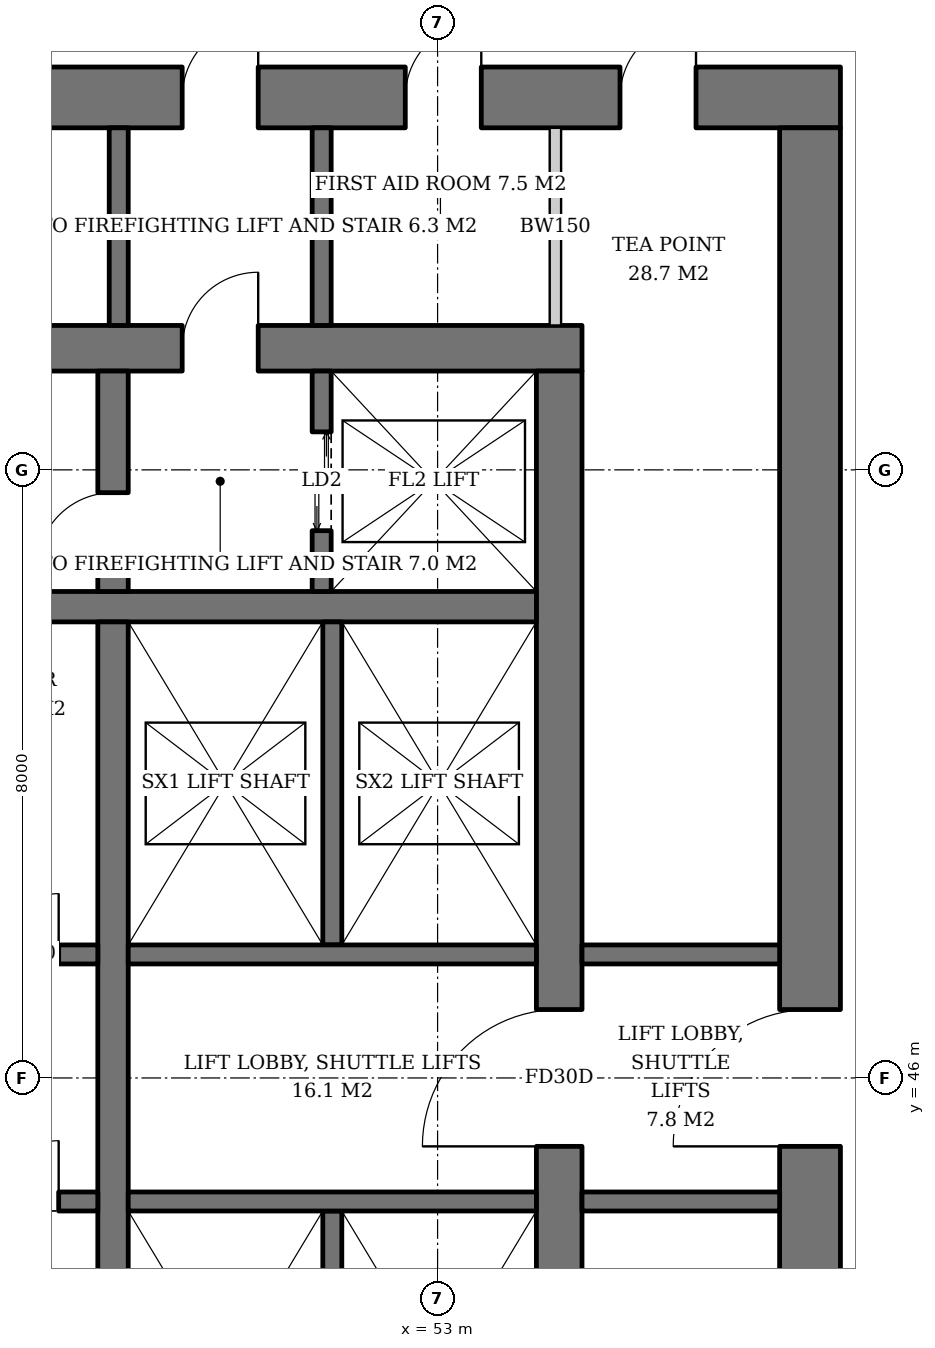
"""IFC4 building model, lengths in metres.
Left out: names, types, materials, properties, quantities, classifications, styles, units other than length and angle.
Written with IfcOpenShell. Run it as: python <this file> out.ifc"""

import sys

from ifc_helpers import new_model, si_unit, direction, frame, frame_2d, origin, place, context, subcontext, project, spatial, rectangle, extrude, element, fill, save


model = new_model("IFC4")
c1 = context("Model", 3, precision=1e-05, world=origin(), true_north=direction((0.0, 1.0)))
c2 = subcontext(c1, "Body", "Model", "MODEL_VIEW")
j1 = project(units=[si_unit("LENGTHUNIT", "METRE"), si_unit("PLANEANGLEUNIT", "RADIAN")], contexts=[c1])
p1 = place(None, origin())
s1 = spatial("IfcSite", under=j1, at=p1, CompositionType="ELEMENT")
p2 = place(p1, origin())
s2 = spatial("IfcBuilding", under=s1, at=p2, CompositionType="ELEMENT")
p3 = place(p2, frame((0.0, 0.0, 36.2)))
s3 = spatial("IfcBuildingStorey", under=s2, at=p3, CompositionType="ELEMENT", Elevation=36.2)
p4 = place(p3, frame((35.1, 55.6, 0.0), z_axis=(0.0, 0.0, 1.0), x_axis=(1.0, 0.0, 0.0)))
e1 = element("IfcWall", 1, at=p4, inside=s3, PredefinedType="SHEAR", context=c2, shape_type="SweptSolid", body=[
    extrude(rectangle(XDim=19.8, YDim=0.6, at=frame_2d((9.9, 0.0))), origin(), (0.0, 0.0, 1.0), 3.8),
])
p5 = place(p4, frame((14.54, 0.0, 0.0)))
e2 = element("IfcOpeningElement", 2, at=p5, cuts=e1, PredefinedType="OPENING", context=c2, shape_type="SweptSolid", body=[
    extrude(rectangle(XDim=1.0, YDim=2.1, at=frame_2d((0.5, 1.05))), frame((0.0, 0.31, 0.0), z_axis=(0.0, -1.0, 0.0), x_axis=(1.0, 0.0, 0.0)), (0.0, 0.0, 1.0), 0.62),
])
p6 = place(p4, frame((2.425, 0.0, 0.0)))
e3 = element("IfcOpeningElement", 3, at=p6, cuts=e1, PredefinedType="OPENING", context=c2, shape_type="SweptSolid", body=[
    extrude(rectangle(XDim=1.0, YDim=2.1, at=frame_2d((0.5, 1.05))), frame((0.0, 0.31, 0.0), z_axis=(0.0, -1.0, 0.0), x_axis=(1.0, 0.0, 0.0)), (0.0, 0.0, 1.0), 0.62),
])
p7 = place(p3, frame((54.6, 36.7, 0.0), z_axis=(0.0, 0.0, 1.0), x_axis=(0.0, 1.0, 0.0)))
e4 = element("IfcWall", 4, at=p7, inside=s3, PredefinedType="SHEAR", context=c2, shape_type="SweptSolid", body=[
    extrude(rectangle(XDim=18.6, YDim=0.6, at=frame_2d((9.3, 0.0))), origin(), (0.0, 0.0, 1.0), 3.8),
])
p8 = place(p7, frame((8.4, 0.0, 0.0)))
e5 = element("IfcOpeningElement", 5, at=p8, cuts=e4, PredefinedType="OPENING", context=c2, shape_type="SweptSolid", body=[
    extrude(rectangle(XDim=1.8, YDim=2.4, at=frame_2d((0.9, 1.2))), frame((0.0, 0.31, 0.0), z_axis=(0.0, -1.0, 0.0), x_axis=(1.0, 0.0, 0.0)), (0.0, 0.0, 1.0), 0.62),
])
p9 = place(p3, frame((31.7, 58.9, 0.0), z_axis=(0.0, 0.0, 1.0), x_axis=(1.0, 0.0, 0.0)))
e6 = element("IfcWall", 6, at=p9, inside=s3, PredefinedType="SHEAR", context=c2, shape_type="SweptSolid", body=[
    extrude(rectangle(XDim=26.6, YDim=0.8, at=frame_2d((13.3, 0.0))), origin(), (0.0, 0.0, 1.0), 3.8),
])
p10 = place(p9, frame((17.94, 0.0, 0.0)))
e7 = element("IfcOpeningElement", 7, at=p10, cuts=e6, PredefinedType="OPENING", context=c2, shape_type="SweptSolid", body=[
    extrude(rectangle(XDim=1.0, YDim=2.1, at=frame_2d((0.5, 1.05))), frame((0.0, 0.41, 0.0), z_axis=(0.0, -1.0, 0.0), x_axis=(1.0, 0.0, 0.0)), (0.0, 0.0, 1.0), 0.82),
])
p11 = place(p9, frame((5.825, 0.0, 0.0)))
e8 = element("IfcOpeningElement", 8, at=p11, cuts=e6, PredefinedType="OPENING", context=c2, shape_type="SweptSolid", body=[
    extrude(rectangle(XDim=1.0, YDim=2.1, at=frame_2d((0.5, 1.05))), frame((0.0, 0.41, 0.0), z_axis=(0.0, -1.0, 0.0), x_axis=(1.0, 0.0, 0.0)), (0.0, 0.0, 1.0), 0.82),
])
p12 = place(p9, frame((1.607, 0.0, 0.0)))
e9 = element("IfcOpeningElement", 9, at=p12, cuts=e6, PredefinedType="OPENING", context=c2, shape_type="SweptSolid", body=[
    extrude(rectangle(XDim=1.0, YDim=2.1, at=frame_2d((0.5, 1.05))), frame((0.0, 0.41, 0.0), z_axis=(0.0, -1.0, 0.0), x_axis=(1.0, 0.0, 0.0)), (0.0, 0.0, 1.0), 0.82),
])
p13 = place(p9, frame((3.666, 0.0, 0.0)))
e10 = element("IfcOpeningElement", 10, at=p13, cuts=e6, PredefinedType="OPENING", context=c2, shape_type="SweptSolid", body=[
    extrude(rectangle(XDim=1.0, YDim=2.1, at=frame_2d((0.5, 1.05))), frame((0.0, 0.41, 0.0), z_axis=(0.0, -1.0, 0.0), x_axis=(1.0, 0.0, 0.0)), (0.0, 0.0, 1.0), 0.82),
])
p14 = place(p9, frame((11.577, 0.0, 0.0)))
e11 = element("IfcOpeningElement", 11, at=p14, cuts=e6, PredefinedType="OPENING", context=c2, shape_type="SweptSolid", body=[
    extrude(rectangle(XDim=1.0, YDim=2.1, at=frame_2d((0.5, 1.05))), frame((0.0, 0.41, 0.0), z_axis=(0.0, -1.0, 0.0), x_axis=(1.0, 0.0, 0.0)), (0.0, 0.0, 1.0), 0.82),
])
p15 = place(p9, frame((20.875, 0.0, 0.0)))
e12 = element("IfcOpeningElement", 12, at=p15, cuts=e6, PredefinedType="OPENING", context=c2, shape_type="SweptSolid", body=[
    extrude(rectangle(XDim=1.0, YDim=2.1, at=frame_2d((0.5, 1.05))), frame((0.0, 0.41, 0.0), z_axis=(0.0, -1.0, 0.0), x_axis=(1.0, 0.0, 0.0)), (0.0, 0.0, 1.0), 0.82),
])
p16 = place(p9, frame((23.7, 0.0, 0.0)))
e13 = element("IfcOpeningElement", 13, at=p16, cuts=e6, PredefinedType="OPENING", context=c2, shape_type="SweptSolid", body=[
    extrude(rectangle(XDim=1.0, YDim=2.1, at=frame_2d((0.5, 1.05))), frame((0.0, 0.41, 0.0), z_axis=(0.0, -1.0, 0.0), x_axis=(1.0, 0.0, 0.0)), (0.0, 0.0, 1.0), 0.82),
])
p17 = place(p3, frame((57.9, 33.5, 0.0), z_axis=(0.0, 0.0, 1.0), x_axis=(0.0, 1.0, 0.0)))
e14 = element("IfcWall", 14, at=p17, inside=s3, PredefinedType="SHEAR", context=c2, shape_type="SweptSolid", body=[
    extrude(rectangle(XDim=25.0, YDim=0.8, at=frame_2d((12.5, 0.0))), origin(), (0.0, 0.0, 1.0), 3.8),
])
p18 = place(p17, frame((11.6, 0.0, 0.0)))
e15 = element("IfcOpeningElement", 15, at=p18, cuts=e14, PredefinedType="OPENING", context=c2, shape_type="SweptSolid", body=[
    extrude(rectangle(XDim=1.8, YDim=2.4, at=frame_2d((0.9, 1.2))), frame((0.0, 0.41, 0.0), z_axis=(0.0, -1.0, 0.0), x_axis=(1.0, 0.0, 0.0)), (0.0, 0.0, 1.0), 0.82),
])
p19 = place(p3, frame((35.7, 52.2, 0.0), z_axis=(0.0, 0.0, 1.0), x_axis=(1.0, 0.0, 0.0)))
e16 = element("IfcWall", 16, at=p19, inside=s3, PredefinedType="SHEAR", context=c2, shape_type="SweptSolid", body=[
    extrude(rectangle(XDim=18.6, YDim=0.4, at=frame_2d((9.3, 0.0))), origin(), (0.0, 0.0, 1.0), 3.8),
])
p20 = place(p3, frame((48.73, 40.0, 0.0), z_axis=(0.0, 0.0, 1.0), x_axis=(0.0, 1.0, 0.0)))
e17 = element("IfcWall", 17, at=p20, inside=s3, PredefinedType="SHEAR", context=c2, shape_type="SweptSolid", body=[
    extrude(rectangle(XDim=12.0, YDim=0.4, at=frame_2d((6.0, 0.0))), origin(), (0.0, 0.0, 1.0), 3.8),
])
p21 = place(p3, frame((48.73, 52.4, 0.0), z_axis=(0.0, 0.0, 1.0), x_axis=(0.0, 1.0, 0.0)))
e18 = element("IfcWall", 18, at=p21, inside=s3, PredefinedType="SHEAR", context=c2, shape_type="SweptSolid", body=[
    extrude(rectangle(XDim=2.9, YDim=0.4, at=frame_2d((1.45, 0.0))), origin(), (0.0, 0.0, 1.0), 3.8),
])
p22 = place(p21, frame((0.3, 0.0, 0.0)))
e19 = element("IfcOpeningElement", 19, at=p22, cuts=e18, PredefinedType="OPENING", context=c2, shape_type="SweptSolid", body=[
    extrude(rectangle(XDim=1.0, YDim=2.1, at=frame_2d((0.5, 1.05))), frame((0.0, 0.21, 0.0), z_axis=(0.0, -1.0, 0.0), x_axis=(1.0, 0.0, 0.0)), (0.0, 0.0, 1.0), 0.42),
])
p23 = place(p3, frame((51.475, 52.4, 0.0), z_axis=(0.0, 0.0, 1.0), x_axis=(0.0, 1.0, 0.0)))
e20 = element("IfcWall", 20, at=p23, inside=s3, PredefinedType="SHEAR", context=c2, shape_type="SweptSolid", body=[
    extrude(rectangle(XDim=2.9, YDim=0.25, at=frame_2d((1.45, 0.0))), origin(), (0.0, 0.0, 1.0), 3.8),
])
p24 = place(p23, frame((0.8, 0.0, 0.0)))
e21 = element("IfcOpeningElement", 21, at=p24, cuts=e20, PredefinedType="OPENING", context=c2, shape_type="SweptSolid", body=[
    extrude(rectangle(XDim=1.3, YDim=2.2, at=frame_2d((0.65, 1.1))), frame((0.0, 0.135, 0.0), z_axis=(0.0, -1.0, 0.0), x_axis=(1.0, 0.0, 0.0)), (0.0, 0.0, 1.0), 0.27),
])
p25 = place(p3, frame((35.7, 47.625, 0.0), z_axis=(0.0, 0.0, 1.0), x_axis=(1.0, 0.0, 0.0)))
e22 = element("IfcWall", 22, at=p25, inside=s3, PredefinedType="SHEAR", context=c2, shape_type="SweptSolid", body=[
    extrude(rectangle(XDim=12.83, YDim=0.25, at=frame_2d((6.415, 0.0))), origin(), (0.0, 0.0, 1.0), 3.8),
])
p26 = place(p25, frame((0.7, 0.0, 0.0)))
e23 = element("IfcOpeningElement", 23, at=p26, cuts=e22, PredefinedType="OPENING", context=c2, shape_type="SweptSolid", body=[
    extrude(rectangle(XDim=1.1, YDim=2.2, at=frame_2d((0.55, 1.1))), frame((0.0, 0.135, 0.0), z_axis=(0.0, -1.0, 0.0), x_axis=(1.0, 0.0, 0.0)), (0.0, 0.0, 1.0), 0.27),
])
p27 = place(p25, frame((3.45, 0.0, 0.0)))
e24 = element("IfcOpeningElement", 24, at=p27, cuts=e22, PredefinedType="OPENING", context=c2, shape_type="SweptSolid", body=[
    extrude(rectangle(XDim=1.1, YDim=2.2, at=frame_2d((0.55, 1.1))), frame((0.0, 0.135, 0.0), z_axis=(0.0, -1.0, 0.0), x_axis=(1.0, 0.0, 0.0)), (0.0, 0.0, 1.0), 0.27),
])
p28 = place(p25, frame((6.2, 0.0, 0.0)))
e25 = element("IfcOpeningElement", 25, at=p28, cuts=e22, PredefinedType="OPENING", context=c2, shape_type="SweptSolid", body=[
    extrude(rectangle(XDim=1.1, YDim=2.2, at=frame_2d((0.55, 1.1))), frame((0.0, 0.135, 0.0), z_axis=(0.0, -1.0, 0.0), x_axis=(1.0, 0.0, 0.0)), (0.0, 0.0, 1.0), 0.27),
])
p29 = place(p25, frame((8.95, 0.0, 0.0)))
e26 = element("IfcOpeningElement", 26, at=p29, cuts=e22, PredefinedType="OPENING", context=c2, shape_type="SweptSolid", body=[
    extrude(rectangle(XDim=1.1, YDim=2.2, at=frame_2d((0.55, 1.1))), frame((0.0, 0.135, 0.0), z_axis=(0.0, -1.0, 0.0), x_axis=(1.0, 0.0, 0.0)), (0.0, 0.0, 1.0), 0.27),
])
p30 = place(p25, frame((11.515, 0.0, 0.0)))
e27 = element("IfcOpeningElement", 27, at=p30, cuts=e22, PredefinedType="OPENING", context=c2, shape_type="SweptSolid", body=[
    extrude(rectangle(XDim=0.8, YDim=2.0, at=frame_2d((0.4, 1.0))), frame((0.0, 0.135, 0.0), z_axis=(0.0, -1.0, 0.0), x_axis=(1.0, 0.0, 0.0)), (0.0, 0.0, 1.0), 0.27),
])
p31 = place(p3, frame((35.7, 44.375, 0.0), z_axis=(0.0, 0.0, 1.0), x_axis=(1.0, 0.0, 0.0)))
e28 = element("IfcWall", 28, at=p31, inside=s3, PredefinedType="SHEAR", context=c2, shape_type="SweptSolid", body=[
    extrude(rectangle(XDim=12.83, YDim=0.25, at=frame_2d((6.415, 0.0))), origin(), (0.0, 0.0, 1.0), 3.8),
])
p32 = place(p31, frame((0.7, 0.0, 0.0)))
e29 = element("IfcOpeningElement", 29, at=p32, cuts=e28, PredefinedType="OPENING", context=c2, shape_type="SweptSolid", body=[
    extrude(rectangle(XDim=1.1, YDim=2.2, at=frame_2d((0.55, 1.1))), frame((0.0, 0.135, 0.0), z_axis=(0.0, -1.0, 0.0), x_axis=(1.0, 0.0, 0.0)), (0.0, 0.0, 1.0), 0.27),
])
p33 = place(p31, frame((3.45, 0.0, 0.0)))
e30 = element("IfcOpeningElement", 30, at=p33, cuts=e28, PredefinedType="OPENING", context=c2, shape_type="SweptSolid", body=[
    extrude(rectangle(XDim=1.1, YDim=2.2, at=frame_2d((0.55, 1.1))), frame((0.0, 0.135, 0.0), z_axis=(0.0, -1.0, 0.0), x_axis=(1.0, 0.0, 0.0)), (0.0, 0.0, 1.0), 0.27),
])
p34 = place(p31, frame((6.2, 0.0, 0.0)))
e31 = element("IfcOpeningElement", 31, at=p34, cuts=e28, PredefinedType="OPENING", context=c2, shape_type="SweptSolid", body=[
    extrude(rectangle(XDim=1.1, YDim=2.2, at=frame_2d((0.55, 1.1))), frame((0.0, 0.135, 0.0), z_axis=(0.0, -1.0, 0.0), x_axis=(1.0, 0.0, 0.0)), (0.0, 0.0, 1.0), 0.27),
])
p35 = place(p31, frame((8.95, 0.0, 0.0)))
e32 = element("IfcOpeningElement", 32, at=p35, cuts=e28, PredefinedType="OPENING", context=c2, shape_type="SweptSolid", body=[
    extrude(rectangle(XDim=1.1, YDim=2.2, at=frame_2d((0.55, 1.1))), frame((0.0, 0.135, 0.0), z_axis=(0.0, -1.0, 0.0), x_axis=(1.0, 0.0, 0.0)), (0.0, 0.0, 1.0), 0.27),
])
p36 = place(p31, frame((11.515, 0.0, 0.0)))
e33 = element("IfcOpeningElement", 33, at=p36, cuts=e28, PredefinedType="OPENING", context=c2, shape_type="SweptSolid", body=[
    extrude(rectangle(XDim=0.8, YDim=2.0, at=frame_2d((0.4, 1.0))), frame((0.0, 0.135, 0.0), z_axis=(0.0, -1.0, 0.0), x_axis=(1.0, 0.0, 0.0)), (0.0, 0.0, 1.0), 0.27),
])
p37 = place(p3, frame((51.615, 47.75, 0.0), z_axis=(0.0, 0.0, 1.0), x_axis=(0.0, 1.0, 0.0)))
e34 = element("IfcWall", 34, at=p37, inside=s3, PredefinedType="SHEAR", context=c2, shape_type="SweptSolid", body=[
    extrude(rectangle(XDim=4.25, YDim=0.25, at=frame_2d((2.125, 0.0))), origin(), (0.0, 0.0, 1.0), 3.8),
])
p38 = place(p3, frame((48.93, 47.625, 0.0), z_axis=(0.0, 0.0, 1.0), x_axis=(1.0, 0.0, 0.0)))
e35 = element("IfcWall", 35, at=p38, inside=s3, PredefinedType="SHEAR", context=c2, shape_type="SweptSolid", body=[
    extrude(rectangle(XDim=5.37, YDim=0.25, at=frame_2d((2.685, 0.0))), origin(), (0.0, 0.0, 1.0), 3.8),
])
p39 = place(p3, frame((51.615, 44.25, 0.0), z_axis=(0.0, 0.0, 1.0), x_axis=(0.0, -1.0, 0.0)))
e36 = element("IfcWall", 36, at=p39, inside=s3, PredefinedType="SHEAR", context=c2, shape_type="SweptSolid", body=[
    extrude(rectangle(XDim=4.25, YDim=0.25, at=frame_2d((2.125, 0.0))), origin(), (0.0, 0.0, 1.0), 3.8),
])
p40 = place(p3, frame((48.93, 44.375, 0.0), z_axis=(0.0, 0.0, 1.0), x_axis=(1.0, 0.0, 0.0)))
e37 = element("IfcWall", 37, at=p40, inside=s3, PredefinedType="SHEAR", context=c2, shape_type="SweptSolid", body=[
    extrude(rectangle(XDim=5.37, YDim=0.25, at=frame_2d((2.685, 0.0))), origin(), (0.0, 0.0, 1.0), 3.8),
])
for number, where, z_axis, x_axis in (
    (38, (48.805, 55.9, 0.0), (0.0, 0.0, 1.0), (0.0, 1.0, 0.0)),
    (39, (51.475, 55.9, 0.0), (0.0, 0.0, 1.0), (0.0, 1.0, 0.0)),
    (40, (54.9, 44.375, 0.0), (0.0, 0.0, 1.0), (1.0, 0.0, 0.0)),
    (41, (54.9, 47.625, 0.0), (0.0, 0.0, 1.0), (1.0, 0.0, 0.0)),
):
    element("IfcWall", number, at=place(p3, frame(where, z_axis=z_axis, x_axis=x_axis)), inside=s3, PredefinedType="SOLIDWALL", context=c2, shape_type="SweptSolid", body=[
        extrude(rectangle(XDim=2.6, YDim=0.25, at=frame_2d((1.3, 0.0))), origin(), (0.0, 0.0, 1.0), 3.62),
    ])
p41 = place(p3, frame((54.55, 55.9, 0.0), z_axis=(0.0, 0.0, 1.0), x_axis=(0.0, 1.0, 0.0)))
e42 = element("IfcWall", 42, at=p41, inside=s3, PredefinedType="SOLIDWALL", context=c2, shape_type="SweptSolid", body=[
    extrude(rectangle(XDim=2.6, YDim=0.15, at=frame_2d((1.3, 0.0))), origin(), (0.0, 0.0, 1.0), 3.62),
])
p42 = place(p24, origin())
e43 = element("IfcDoor", 43, at=p42, inside=s3, OperationType="DOUBLE_DOOR_SLIDING", PredefinedType="DOOR", context=c2, shape_type="SweptSolid", body=[
    extrude(rectangle(XDim=1.3, YDim=2.2, at=frame_2d((0.65, 1.1))), frame((0.0, 0.025, 0.0), z_axis=(0.0, -1.0, 0.0), x_axis=(1.0, 0.0, 0.0)), (0.0, 0.0, 1.0), 0.05),
])
fill(e21, e43)
p43 = place(p30, origin())
e44 = element("IfcDoor", 44, at=p43, inside=s3, OperationType="SINGLE_SWING_RIGHT", PredefinedType="DOOR", context=c2, shape_type="SweptSolid", body=[
    extrude(rectangle(XDim=0.8, YDim=2.0, at=frame_2d((0.4, 1.0))), frame((0.0, 0.025, 0.0), z_axis=(0.0, -1.0, 0.0), x_axis=(1.0, 0.0, 0.0)), (0.0, 0.0, 1.0), 0.05),
])
fill(e27, e44)
p44 = place(p36, origin())
e45 = element("IfcDoor", 45, at=p44, inside=s3, OperationType="SINGLE_SWING_RIGHT", PredefinedType="DOOR", context=c2, shape_type="SweptSolid", body=[
    extrude(rectangle(XDim=0.8, YDim=2.0, at=frame_2d((0.4, 1.0))), frame((0.0, 0.025, 0.0), z_axis=(0.0, -1.0, 0.0), x_axis=(1.0, 0.0, 0.0)), (0.0, 0.0, 1.0), 0.05),
])
fill(e33, e45)
p45 = place(p22, origin())
e46 = element("IfcDoor", 46, at=p45, inside=s3, OperationType="SINGLE_SWING_LEFT", PredefinedType="DOOR", context=c2, shape_type="SweptSolid", body=[
    extrude(rectangle(XDim=1.0, YDim=2.1, at=frame_2d((0.5, 1.05))), frame((0.0, 0.025, 0.0), z_axis=(0.0, -1.0, 0.0), x_axis=(1.0, 0.0, 0.0)), (0.0, 0.0, 1.0), 0.05),
])
fill(e19, e46)
p46 = place(p5, origin())
e47 = element("IfcDoor", 47, at=p46, inside=s3, OperationType="SINGLE_SWING_RIGHT", PredefinedType="DOOR", context=c2, shape_type="SweptSolid", body=[
    extrude(rectangle(XDim=1.0, YDim=2.1, at=frame_2d((0.5, 1.05))), frame((0.0, 0.025, 0.0), z_axis=(0.0, -1.0, 0.0), x_axis=(1.0, 0.0, 0.0)), (0.0, 0.0, 1.0), 0.05),
])
fill(e2, e47)
p47 = place(p8, origin())
e48 = element("IfcDoor", 48, at=p47, inside=s3, OperationType="DOUBLE_DOOR_SINGLE_SWING", PredefinedType="DOOR", context=c2, shape_type="SweptSolid", body=[
    extrude(rectangle(XDim=1.8, YDim=2.4, at=frame_2d((0.9, 1.2))), frame((0.0, 0.025, 0.0), z_axis=(0.0, -1.0, 0.0), x_axis=(1.0, 0.0, 0.0)), (0.0, 0.0, 1.0), 0.05),
])
fill(e5, e48)
p48 = place(p18, origin())
e49 = element("IfcDoor", 49, at=p48, inside=s3, OperationType="DOUBLE_DOOR_SINGLE_SWING", PredefinedType="DOOR", context=c2, shape_type="SweptSolid", body=[
    extrude(rectangle(XDim=1.8, YDim=2.4, at=frame_2d((0.9, 1.2))), frame((0.0, 0.025, 0.0), z_axis=(0.0, -1.0, 0.0), x_axis=(1.0, 0.0, 0.0)), (0.0, 0.0, 1.0), 0.05),
])
fill(e15, e49)
p49 = place(p10, origin())
e50 = element("IfcDoor", 50, at=p49, inside=s3, OperationType="SINGLE_SWING_RIGHT", PredefinedType="DOOR", context=c2, shape_type="SweptSolid", body=[
    extrude(rectangle(XDim=1.0, YDim=2.1, at=frame_2d((0.5, 1.05))), frame((0.0, 0.025, 0.0), z_axis=(0.0, -1.0, 0.0), x_axis=(1.0, 0.0, 0.0)), (0.0, 0.0, 1.0), 0.05),
])
fill(e7, e50)
p50 = place(p15, origin())
e51 = element("IfcDoor", 51, at=p50, inside=s3, OperationType="SINGLE_SWING_RIGHT", PredefinedType="DOOR", context=c2, shape_type="SweptSolid", body=[
    extrude(rectangle(XDim=1.0, YDim=2.1, at=frame_2d((0.5, 1.05))), frame((0.0, -0.34, 0.0), z_axis=(0.0, -1.0, 0.0), x_axis=(1.0, 0.0, 0.0)), (0.0, 0.0, 1.0), 0.05),
])
fill(e12, e51)
p51 = place(p16, origin())
e52 = element("IfcDoor", 52, at=p51, inside=s3, OperationType="SINGLE_SWING_RIGHT", PredefinedType="DOOR", context=c2, shape_type="SweptSolid", body=[
    extrude(rectangle(XDim=1.0, YDim=2.1, at=frame_2d((0.5, 1.05))), frame((0.0, -0.34, 0.0), z_axis=(0.0, -1.0, 0.0), x_axis=(1.0, 0.0, 0.0)), (0.0, 0.0, 1.0), 0.05),
])
fill(e13, e52)
save(model, sys.argv[1])
